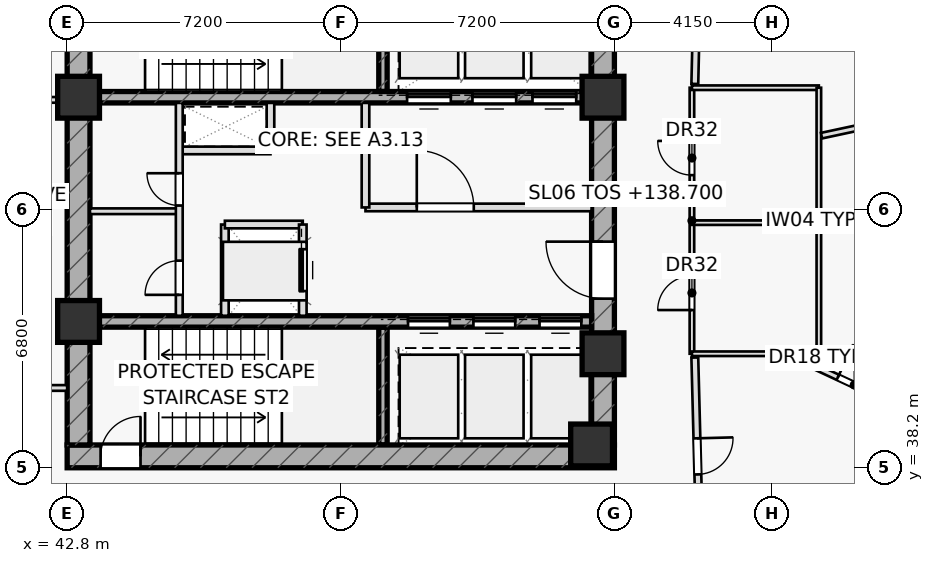
"""IFC4 building model, lengths in metres.
Left out: names, types, materials, properties, quantities, classifications, styles, units other than length and angle.
Written with IfcOpenShell. Run it as: python <this file> out.ifc"""

import sys

from ifc_helpers import new_model, si_unit, direction, frame, frame_2d, origin, origin_2d, place, context, subcontext, project, spatial, rectangle, extrude, element, fill, save


model = new_model("IFC4")
c1 = context("Model", 3, precision=1e-05, world=origin(), true_north=direction((0.0, 1.0)))
c2 = subcontext(c1, "Body", "Model", "MODEL_VIEW")
j1 = project(units=[si_unit("LENGTHUNIT", "METRE"), si_unit("PLANEANGLEUNIT", "RADIAN")], contexts=[c1])
p1 = place(None, origin())
s1 = spatial("IfcSite", under=j1, at=p1, CompositionType="ELEMENT")
p2 = place(p1, origin())
s2 = spatial("IfcBuilding", under=s1, at=p2, CompositionType="ELEMENT")
p3 = place(p2, frame((0.0, 0.0, 138.7)))
s3 = spatial("IfcBuildingStorey", under=s2, at=p3, CompositionType="ELEMENT", Elevation=138.7)
for number, where, z_axis, x_axis in (
    (1, (51.11, 48.1, 0.0), (0.0, 0.0, 1.0), (0.0, 1.0, 0.0)),
    (2, (51.11, 38.8, 0.0), (0.0, 0.0, 1.0), (0.0, 1.0, 0.0)),
):
    element("IfcWall", number, at=place(p3, frame(where, z_axis=z_axis, x_axis=x_axis)), inside=s3, PredefinedType="SHEAR", context=c2, shape_type="SweptSolid", body=[
        extrude(rectangle(XDim=3.1, YDim=0.22, at=frame_2d((1.55, 0.0))), origin(), (0.0, 0.0, 1.0), 3.55),
    ])
p4 = place(p3, frame((42.8, 38.5, 0.0), z_axis=(0.0, 0.0, 1.0), x_axis=(1.0, 0.0, 0.0)))
e3 = element("IfcWall", 3, at=p4, inside=s3, PredefinedType="SHEAR", context=c2, shape_type="SweptSolid", body=[
    extrude(rectangle(XDim=14.4, YDim=0.6, at=frame_2d((7.2, 0.0))), origin(), (0.0, 0.0, 1.0), 3.55),
])
p5 = place(p4, frame((0.88, 0.0, 0.0)))
e4 = element("IfcOpeningElement", 4, at=p5, cuts=e3, PredefinedType="OPENING", context=c2, shape_type="SweptSolid", body=[
    extrude(rectangle(XDim=1.05, YDim=2.2, at=frame_2d((0.525, 1.1))), frame((0.0, 0.31, 0.0), z_axis=(0.0, -1.0, 0.0), x_axis=(1.0, 0.0, 0.0)), (0.0, 0.0, 1.0), 0.62),
])
p6 = place(p3, frame((43.1, 38.8, 0.0), z_axis=(0.0, 0.0, 1.0), x_axis=(0.0, 1.0, 0.0)))
e5 = element("IfcWall", 5, at=p6, inside=s3, PredefinedType="SHEAR", context=c2, shape_type="SweptSolid", body=[
    extrude(rectangle(XDim=12.4, YDim=0.6, at=frame_2d((6.2, 0.0))), origin(), (0.0, 0.0, 1.0), 3.55),
])
p7 = place(p3, frame((56.9, 38.8, 0.0), z_axis=(0.0, 0.0, 1.0), x_axis=(0.0, 1.0, 0.0)))
e6 = element("IfcWall", 6, at=p7, inside=s3, PredefinedType="SHEAR", context=c2, shape_type="SweptSolid", body=[
    extrude(rectangle(XDim=12.4, YDim=0.6, at=frame_2d((6.2, 0.0))), origin(), (0.0, 0.0, 1.0), 3.55),
])
p8 = place(p7, frame((3.85, 0.0, 0.0)))
e7 = element("IfcOpeningElement", 7, at=p8, cuts=e6, PredefinedType="OPENING", context=c2, shape_type="SweptSolid", body=[
    extrude(rectangle(XDim=1.5, YDim=2.2, at=frame_2d((0.75, 1.1))), frame((0.0, 0.31, 0.0), z_axis=(0.0, -1.0, 0.0), x_axis=(1.0, 0.0, 0.0)), (0.0, 0.0, 1.0), 0.62),
])
p9 = place(p3, frame((43.4, 47.95, 0.0), z_axis=(0.0, 0.0, 1.0), x_axis=(1.0, 0.0, 0.0)))
e8 = element("IfcWall", 8, at=p9, inside=s3, PredefinedType="SHEAR", context=c2, shape_type="SweptSolid", body=[
    extrude(rectangle(XDim=13.2, YDim=0.3, at=frame_2d((6.6, 0.0))), origin(), (0.0, 0.0, 1.0), 3.55),
])
p10 = place(p9, frame((8.345, 0.0, 0.0)))
e9 = element("IfcOpeningElement", 9, at=p10, cuts=e8, PredefinedType="OPENING", context=c2, shape_type="SweptSolid", body=[
    extrude(rectangle(XDim=1.15, YDim=2.2, at=frame_2d((0.575, 1.1))), frame((0.0, 0.16, 0.0), z_axis=(0.0, -1.0, 0.0), x_axis=(1.0, 0.0, 0.0)), (0.0, 0.0, 1.0), 0.32),
])
p11 = place(p9, frame((10.065, 0.0, 0.0)))
e10 = element("IfcOpeningElement", 10, at=p11, cuts=e8, PredefinedType="OPENING", context=c2, shape_type="SweptSolid", body=[
    extrude(rectangle(XDim=1.15, YDim=2.2, at=frame_2d((0.575, 1.1))), frame((0.0, 0.16, 0.0), z_axis=(0.0, -1.0, 0.0), x_axis=(1.0, 0.0, 0.0)), (0.0, 0.0, 1.0), 0.32),
])
p12 = place(p9, frame((11.645, 0.0, 0.0)))
e11 = element("IfcOpeningElement", 11, at=p12, cuts=e8, PredefinedType="OPENING", context=c2, shape_type="SweptSolid", body=[
    extrude(rectangle(XDim=1.15, YDim=2.2, at=frame_2d((0.575, 1.1))), frame((0.0, 0.16, 0.0), z_axis=(0.0, -1.0, 0.0), x_axis=(1.0, 0.0, 0.0)), (0.0, 0.0, 1.0), 0.32),
])
p13 = place(p3, frame((43.4, 42.05, 0.0), z_axis=(0.0, 0.0, 1.0), x_axis=(1.0, 0.0, 0.0)))
e12 = element("IfcWall", 12, at=p13, inside=s3, PredefinedType="SHEAR", context=c2, shape_type="SweptSolid", body=[
    extrude(rectangle(XDim=13.2, YDim=0.3, at=frame_2d((6.6, 0.0))), origin(), (0.0, 0.0, 1.0), 3.55),
])
p14 = place(p13, frame((8.37, 0.0, 0.0)))
e13 = element("IfcOpeningElement", 13, at=p14, cuts=e12, PredefinedType="OPENING", context=c2, shape_type="SweptSolid", body=[
    extrude(rectangle(XDim=1.1, YDim=2.15, at=frame_2d((0.55, 1.075))), frame((0.0, 0.16, 0.0), z_axis=(0.0, -1.0, 0.0), x_axis=(1.0, 0.0, 0.0)), (0.0, 0.0, 1.0), 0.32),
])
p15 = place(p13, frame((10.09, 0.0, 0.0)))
e14 = element("IfcOpeningElement", 14, at=p15, cuts=e12, PredefinedType="OPENING", context=c2, shape_type="SweptSolid", body=[
    extrude(rectangle(XDim=1.1, YDim=2.15, at=frame_2d((0.55, 1.075))), frame((0.0, 0.16, 0.0), z_axis=(0.0, -1.0, 0.0), x_axis=(1.0, 0.0, 0.0)), (0.0, 0.0, 1.0), 0.32),
])
p16 = place(p13, frame((11.83, 0.0, 0.0)))
e15 = element("IfcOpeningElement", 15, at=p16, cuts=e12, PredefinedType="OPENING", context=c2, shape_type="SweptSolid", body=[
    extrude(rectangle(XDim=1.1, YDim=2.15, at=frame_2d((0.55, 1.075))), frame((0.0, 0.16, 0.0), z_axis=(0.0, -1.0, 0.0), x_axis=(1.0, 0.0, 0.0)), (0.0, 0.0, 1.0), 0.32),
])
for number, where, z_axis, x_axis in (
    (16, (43.1, 47.95, 0.0), (0.0, 0.0, 1.0), (1.0, 0.0, 0.0)),
    (17, (56.9, 47.95, 0.0), (0.0, 0.0, 1.0), (1.0, 0.0, 0.0)),
    (18, (43.1, 42.05, 0.0), (0.0, 0.0, 1.0), (1.0, 0.0, 0.0)),
    (19, (56.9, 41.2, 0.0), (0.0, 0.0, 1.0), (1.0, 0.0, 0.0)),
    (20, (56.6, 38.8, 0.0), (0.0, 0.0, 1.0), (1.0, 0.0, 0.0)),
):
    element("IfcColumn", number, at=place(p3, frame(where, z_axis=z_axis, x_axis=x_axis)), inside=s3, PredefinedType="COLUMN", context=c2, shape_type="SweptSolid", body=[
        extrude(rectangle(XDim=1.1, YDim=1.1, at=origin_2d()), origin(), (0.0, 0.0, 1.0), 3.55),
    ])
p17 = place(p3, frame((45.75, 46.55, 0.0), z_axis=(0.0, 0.0, 1.0), x_axis=(1.0, 0.0, 0.0)))
e21 = element("IfcWall", 21, at=p17, inside=s3, PredefinedType="PARTITIONING", context=c2, shape_type="SweptSolid", body=[
    extrude(rectangle(XDim=2.4, YDim=0.2, at=frame_2d((1.2, 0.0))), origin(), (0.0, 0.0, 1.0), 3.55),
])
p18 = place(p3, frame((48.15, 46.55, 0.0), z_axis=(0.0, 0.0, 1.0), x_axis=(0.0, 1.0, 0.0)))
e22 = element("IfcWall", 22, at=p18, inside=s3, PredefinedType="PARTITIONING", context=c2, shape_type="SweptSolid", body=[
    extrude(rectangle(XDim=1.25, YDim=0.2, at=frame_2d((0.625, 0.0))), origin(), (0.0, 0.0, 1.0), 3.55),
])
p19 = place(p3, frame((46.95, 42.2, 0.0), z_axis=(0.0, 0.0, 1.0), x_axis=(0.0, 1.0, 0.0)))
e23 = element("IfcWall", 23, at=p19, inside=s3, PredefinedType="PARTITIONING", context=c2, shape_type="SweptSolid", body=[
    extrude(rectangle(XDim=2.4, YDim=0.2, at=frame_2d((1.2, 0.0))), origin(), (0.0, 0.0, 1.0), 3.55),
])
p20 = place(p3, frame((46.95, 44.6, 0.0), z_axis=(0.0, 0.0, 1.0), x_axis=(1.0, 0.0, 0.0)))
e24 = element("IfcWall", 24, at=p20, inside=s3, PredefinedType="PARTITIONING", context=c2, shape_type="SweptSolid", body=[
    extrude(rectangle(XDim=2.05, YDim=0.2, at=frame_2d((1.025, 0.0))), origin(), (0.0, 0.0, 1.0), 3.55),
])
p21 = place(p3, frame((50.65, 45.05, 0.0), z_axis=(0.0, 0.0, 1.0), x_axis=(1.0, 0.0, 0.0)))
e25 = element("IfcWall", 25, at=p21, inside=s3, PredefinedType="PARTITIONING", context=c2, shape_type="SweptSolid", body=[
    extrude(rectangle(XDim=5.95, YDim=0.2, at=frame_2d((2.975, 0.0))), origin(), (0.0, 0.0, 1.0), 3.55),
])
p22 = place(p21, frame((1.35, 0.0, 0.0)))
e26 = element("IfcOpeningElement", 26, at=p22, cuts=e25, PredefinedType="OPENING", context=c2, shape_type="SweptSolid", body=[
    extrude(rectangle(XDim=1.5, YDim=2.2, at=frame_2d((0.75, 1.1))), frame((0.0, 0.11, 0.0), z_axis=(0.0, -1.0, 0.0), x_axis=(1.0, 0.0, 0.0)), (0.0, 0.0, 1.0), 0.22),
])
p23 = place(p3, frame((50.65, 45.05, 0.0), z_axis=(0.0, 0.0, 1.0), x_axis=(0.0, 1.0, 0.0)))
e27 = element("IfcWall", 27, at=p23, inside=s3, PredefinedType="PARTITIONING", context=c2, shape_type="SweptSolid", body=[
    extrude(rectangle(XDim=2.75, YDim=0.2, at=frame_2d((1.375, 0.0))), origin(), (0.0, 0.0, 1.0), 3.55),
])
p24 = place(p3, frame((43.4, 44.95, 0.0), z_axis=(0.0, 0.0, 1.0), x_axis=(1.0, 0.0, 0.0)))
e28 = element("IfcWall", 28, at=p24, inside=s3, PredefinedType="PARTITIONING", context=c2, shape_type="SweptSolid", body=[
    extrude(rectangle(XDim=2.35, YDim=0.15, at=frame_2d((1.175, 0.0))), origin(), (0.0, 0.0, 1.0), 3.55),
])
p25 = place(p3, frame((45.75, 42.2, 0.0), z_axis=(0.0, 0.0, 1.0), x_axis=(0.0, 1.0, 0.0)))
e29 = element("IfcWall", 29, at=p25, inside=s3, PredefinedType="PARTITIONING", context=c2, shape_type="SweptSolid", body=[
    extrude(rectangle(XDim=5.6, YDim=0.18, at=frame_2d((2.8, 0.0))), origin(), (0.0, 0.0, 1.0), 3.55),
])
p26 = place(p25, frame((0.55, 0.0, 0.0)))
e30 = element("IfcOpeningElement", 30, at=p26, cuts=e29, PredefinedType="OPENING", context=c2, shape_type="SweptSolid", body=[
    extrude(rectangle(XDim=0.9, YDim=2.05, at=frame_2d((0.45, 1.025))), frame((0.0, 0.1, 0.0), z_axis=(0.0, -1.0, 0.0), x_axis=(1.0, 0.0, 0.0)), (0.0, 0.0, 1.0), 0.2),
])
p27 = place(p25, frame((2.9, 0.0, 0.0)))
e31 = element("IfcOpeningElement", 31, at=p27, cuts=e29, PredefinedType="OPENING", context=c2, shape_type="SweptSolid", body=[
    extrude(rectangle(XDim=0.85, YDim=2.05, at=frame_2d((0.425, 1.025))), frame((0.0, 0.1, 0.0), z_axis=(0.0, -1.0, 0.0), x_axis=(1.0, 0.0, 0.0)), (0.0, 0.0, 1.0), 0.2),
])
p28 = place(p3, frame((37.14, 40.3, 0.0), z_axis=(0.0, 0.0, 1.0), x_axis=(1.0, 0.0, 0.0)))
e32 = element("IfcWall", 32, at=p28, inside=s3, PredefinedType="PARTITIONING", context=c2, shape_type="SweptSolid", body=[
    extrude(rectangle(XDim=5.66, YDim=0.15, at=frame_2d((2.83, 0.0))), origin(), (0.0, 0.0, 1.0), 3.55),
])
p29 = place(p28, frame((3.21, 0.0, 0.0)))
e33 = element("IfcOpeningElement", 33, at=p29, cuts=e32, PredefinedType="OPENING", context=c2, shape_type="SweptSolid", body=[
    extrude(rectangle(XDim=0.95, YDim=2.05, at=frame_2d((0.475, 1.025))), frame((0.0, 0.085, 0.0), z_axis=(0.0, -1.0, 0.0), x_axis=(1.0, 0.0, 0.0)), (0.0, 0.0, 1.0), 0.17),
])
p30 = place(p3, frame((37.14, 47.88, 0.0), z_axis=(0.0, 0.0, 1.0), x_axis=(1.0, 0.0, 0.0)))
e34 = element("IfcWall", 34, at=p30, inside=s3, PredefinedType="PARTITIONING", context=c2, shape_type="SweptSolid", body=[
    extrude(rectangle(XDim=5.66, YDim=0.15, at=frame_2d((2.83, 0.0))), origin(), (0.0, 0.0, 1.0), 2.835),
])
p31 = place(p3, frame((59.24, 41.2, 0.0), z_axis=(0.0, 0.0, 1.0), x_axis=(0.0, 1.0, 0.0)))
e35 = element("IfcWall", 35, at=p31, inside=s3, PredefinedType="PARTITIONING", context=c2, shape_type="SweptSolid", body=[
    extrude(rectangle(XDim=7.0, YDim=0.12, at=frame_2d((3.5, 0.0))), origin(), (0.0, 0.0, 1.0), 3.55),
])
p32 = place(p31, frame((1.15, 0.0, 0.0)))
e36 = element("IfcOpeningElement", 36, at=p32, cuts=e35, PredefinedType="OPENING", context=c2, shape_type="SweptSolid", body=[
    extrude(rectangle(XDim=0.9, YDim=2.05, at=frame_2d((0.45, 1.025))), frame((0.0, 0.07, 0.0), z_axis=(0.0, -1.0, 0.0), x_axis=(1.0, 0.0, 0.0)), (0.0, 0.0, 1.0), 0.14),
])
p33 = place(p31, frame((4.7, 0.0, 0.0)))
e37 = element("IfcOpeningElement", 37, at=p33, cuts=e35, PredefinedType="OPENING", context=c2, shape_type="SweptSolid", body=[
    extrude(rectangle(XDim=0.9, YDim=2.05, at=frame_2d((0.45, 1.025))), frame((0.0, 0.07, 0.0), z_axis=(0.0, -1.0, 0.0), x_axis=(1.0, 0.0, 0.0)), (0.0, 0.0, 1.0), 0.14),
])
for number, where, z_axis, x_axis in (
    (38, (59.24, 41.2, 0.0), (0.0, 0.0, 1.0), (1.0, 0.0, 0.0)),
    (39, (59.24, 44.65, 0.0), (0.0, 0.0, 1.0), (1.0, 0.0, 0.0)),
    (40, (59.24, 48.2, 0.0), (0.0, 0.0, 1.0), (1.0, 0.0, 0.0)),
):
    element("IfcWall", number, at=place(p3, frame(where, z_axis=z_axis, x_axis=x_axis)), inside=s3, PredefinedType="PARTITIONING", context=c2, shape_type="SweptSolid", body=[
        extrude(rectangle(XDim=3.34, YDim=0.12, at=frame_2d((1.67, 0.0))), origin(), (0.0, 0.0, 1.0), 3.55),
    ])
p34 = place(p3, frame((62.58, 41.2, 0.0), z_axis=(0.0, 0.0, 1.0), x_axis=(0.0, 1.0, 0.0)))
e41 = element("IfcWall", 41, at=p34, inside=s3, PredefinedType="PARTITIONING", context=c2, shape_type="SweptSolid", body=[
    extrude(rectangle(XDim=7.0, YDim=0.12, at=frame_2d((3.5, 0.0))), origin(), (0.0, 0.0, 1.0), 3.55),
])
p35 = place(p3, frame((61.856, 41.15, 0.0), z_axis=(0.0, 0.0, 1.0), x_axis=(0.906306749667, -0.42262048638, 0.0)))
e42 = element("IfcWall", 42, at=p35, inside=s3, PredefinedType="PARTITIONING", context=c2, shape_type="SweptSolid", body=[
    extrude(rectangle(XDim=16.596, YDim=0.15, at=frame_2d((8.298, 0.0))), origin(), (0.0, 0.0, 1.0), 2.835),
])
p36 = place(p35, frame((1.35, 0.0, 0.0)))
e43 = element("IfcOpeningElement", 43, at=p36, cuts=e42, PredefinedType="OPENING", context=c2, shape_type="SweptSolid", body=[
    extrude(rectangle(XDim=0.95, YDim=2.05, at=frame_2d((0.475, 1.025))), frame((0.0, 0.085, 0.0), z_axis=(0.0, -1.0, 0.0), x_axis=(1.0, 0.0, 0.0)), (0.0, 0.0, 1.0), 0.17),
])
p37 = place(p3, frame((62.65, 46.938, 0.0), z_axis=(0.0, 0.0, 1.0), x_axis=(0.977819728846, 0.209448270173, 0.0)))
e44 = element("IfcWall", 44, at=p37, inside=s3, PredefinedType="PARTITIONING", context=c2, shape_type="SweptSolid", body=[
    extrude(rectangle(XDim=17.123, YDim=0.15, at=frame_2d((8.562, 0.0))), origin(), (0.0, 0.0, 1.0), 2.975),
])
p38 = place(p3, frame((59.451, 54.1, 0.0), z_axis=(0.0, 0.0, 1.0), x_axis=(-0.023271046154, -0.999729192537, 0.0)))
e45 = element("IfcWall", 45, at=p38, inside=s3, PredefinedType="PARTITIONING", context=c2, shape_type="SweptSolid", body=[
    extrude(rectangle(XDim=5.802, YDim=0.18, at=frame_2d((2.901, 0.0))), origin(), (0.0, 0.0, 1.0), 2.835),
])
p39 = place(p38, frame((2.426, 0.0, 0.0)))
e46 = element("IfcOpeningElement", 46, at=p39, cuts=e45, PredefinedType="OPENING", context=c2, shape_type="SweptSolid", body=[
    extrude(rectangle(XDim=0.95, YDim=2.05, at=frame_2d((0.475, 1.025))), frame((0.0, 0.1, 0.0), z_axis=(0.0, -1.0, 0.0), x_axis=(1.0, 0.0, 0.0)), (0.0, 0.0, 1.0), 0.2),
])
p40 = place(p3, frame((59.316, 41.1, 0.0), z_axis=(0.0, 0.0, 1.0), x_axis=(0.025953695765, -0.999663146103, 0.0)))
e47 = element("IfcWall", 47, at=p40, inside=s3, PredefinedType="PARTITIONING", context=c2, shape_type="SweptSolid", body=[
    extrude(rectangle(XDim=5.202, YDim=0.18, at=frame_2d((2.601, 0.0))), origin(), (0.0, 0.0, 1.0), 2.835),
])
p41 = place(p40, frame((2.126, 0.0, 0.0)))
e48 = element("IfcOpeningElement", 48, at=p41, cuts=e47, PredefinedType="OPENING", context=c2, shape_type="SweptSolid", body=[
    extrude(rectangle(XDim=0.95, YDim=2.05, at=frame_2d((0.475, 1.025))), frame((0.0, 0.1, 0.0), z_axis=(0.0, -1.0, 0.0), x_axis=(1.0, 0.0, 0.0)), (0.0, 0.0, 1.0), 0.2),
])
p42 = place(p3, frame((49.0, 42.2, 0.0), z_axis=(0.0, 0.0, 1.0), x_axis=(0.0, 1.0, 0.0)))
e49 = element("IfcWall", 49, at=p42, inside=s3, PredefinedType="PARTITIONING", context=c2, shape_type="SweptSolid", body=[
    extrude(rectangle(XDim=2.4, YDim=0.2, at=frame_2d((1.2, 0.0))), origin(), (0.0, 0.0, 1.0), 3.55),
])
p43 = place(p42, frame((0.65, 0.0, 0.0)))
e50 = element("IfcOpeningElement", 50, at=p43, cuts=e49, PredefinedType="OPENING", context=c2, shape_type="SweptSolid", body=[
    extrude(rectangle(XDim=1.1, YDim=2.15, at=frame_2d((0.55, 1.075))), frame((0.0, 0.11, 0.0), z_axis=(0.0, -1.0, 0.0), x_axis=(1.0, 0.0, 0.0)), (0.0, 0.0, 1.0), 0.22),
])
p44 = place(p5, origin())
e51 = element("IfcDoor", 51, at=p44, inside=s3, OperationType="SINGLE_SWING_RIGHT", PredefinedType="DOOR", context=c2, shape_type="SweptSolid", body=[
    extrude(rectangle(XDim=1.05, YDim=2.2, at=frame_2d((0.525, 1.1))), frame((0.0, 0.025, 0.0), z_axis=(0.0, -1.0, 0.0), x_axis=(1.0, 0.0, 0.0)), (0.0, 0.0, 1.0), 0.05),
])
fill(e4, e51)
p45 = place(p8, origin())
e52 = element("IfcDoor", 52, at=p45, inside=s3, OperationType="SINGLE_SWING_RIGHT", PredefinedType="DOOR", context=c2, shape_type="SweptSolid", body=[
    extrude(rectangle(XDim=1.5, YDim=2.2, at=frame_2d((0.75, 1.1))), frame((0.0, 0.025, 0.0), z_axis=(0.0, -1.0, 0.0), x_axis=(1.0, 0.0, 0.0)), (0.0, 0.0, 1.0), 0.05),
])
fill(e7, e52)
p46 = place(p22, origin())
e53 = element("IfcDoor", 53, at=p46, inside=s3, OperationType="SINGLE_SWING_LEFT", PredefinedType="DOOR", context=c2, shape_type="SweptSolid", body=[
    extrude(rectangle(XDim=1.5, YDim=2.2, at=frame_2d((0.75, 1.1))), frame((0.0, 0.025, 0.0), z_axis=(0.0, -1.0, 0.0), x_axis=(1.0, 0.0, 0.0)), (0.0, 0.0, 1.0), 0.05),
])
fill(e26, e53)
p47 = place(p26, origin())
e54 = element("IfcDoor", 54, at=p47, inside=s3, OperationType="SINGLE_SWING_LEFT", PredefinedType="DOOR", context=c2, shape_type="SweptSolid", body=[
    extrude(rectangle(XDim=0.9, YDim=2.05, at=frame_2d((0.45, 1.025))), frame((0.0, 0.025, 0.0), z_axis=(0.0, -1.0, 0.0), x_axis=(1.0, 0.0, 0.0)), (0.0, 0.0, 1.0), 0.05),
])
fill(e30, e54)
p48 = place(p27, origin())
e55 = element("IfcDoor", 55, at=p48, inside=s3, OperationType="SINGLE_SWING_RIGHT", PredefinedType="DOOR", context=c2, shape_type="SweptSolid", body=[
    extrude(rectangle(XDim=0.85, YDim=2.05, at=frame_2d((0.425, 1.025))), frame((0.0, 0.025, 0.0), z_axis=(0.0, -1.0, 0.0), x_axis=(1.0, 0.0, 0.0)), (0.0, 0.0, 1.0), 0.05),
])
fill(e31, e55)
p49 = place(p32, origin())
e56 = element("IfcDoor", 56, at=p49, inside=s3, OperationType="SINGLE_SWING_LEFT", PredefinedType="DOOR", context=c2, shape_type="SweptSolid", body=[
    extrude(rectangle(XDim=0.9, YDim=2.05, at=frame_2d((0.45, 1.025))), frame((0.0, 0.025, 0.0), z_axis=(0.0, -1.0, 0.0), x_axis=(1.0, 0.0, 0.0)), (0.0, 0.0, 1.0), 0.05),
])
fill(e36, e56)
p50 = place(p33, origin())
e57 = element("IfcDoor", 57, at=p50, inside=s3, OperationType="SINGLE_SWING_RIGHT", PredefinedType="DOOR", context=c2, shape_type="SweptSolid", body=[
    extrude(rectangle(XDim=0.9, YDim=2.05, at=frame_2d((0.45, 1.025))), frame((0.0, 0.025, 0.0), z_axis=(0.0, -1.0, 0.0), x_axis=(1.0, 0.0, 0.0)), (0.0, 0.0, 1.0), 0.05),
])
fill(e37, e57)
p51 = place(p36, origin())
e58 = element("IfcDoor", 58, at=p51, inside=s3, OperationType="SINGLE_SWING_LEFT", PredefinedType="DOOR", context=c2, shape_type="SweptSolid", body=[
    extrude(rectangle(XDim=0.95, YDim=2.05, at=frame_2d((0.475, 1.025))), frame((0.0, 0.025, 0.0), z_axis=(0.0, -1.0, 0.0), x_axis=(1.0, 0.0, 0.0)), (0.0, 0.0, 1.0), 0.05),
])
fill(e43, e58)
p52 = place(p41, origin())
e59 = element("IfcDoor", 59, at=p52, inside=s3, OperationType="SINGLE_SWING_LEFT", PredefinedType="DOOR", context=c2, shape_type="SweptSolid", body=[
    extrude(rectangle(XDim=0.95, YDim=2.05, at=frame_2d((0.475, 1.025))), frame((0.0, 0.025, 0.0), z_axis=(0.0, -1.0, 0.0), x_axis=(1.0, 0.0, 0.0)), (0.0, 0.0, 1.0), 0.05),
])
fill(e48, e59)
p53 = place(p10, origin())
e60 = element("IfcDoor", 60, at=p53, inside=s3, OperationType="SLIDING_TO_LEFT", PredefinedType="DOOR", context=c2, shape_type="SweptSolid", body=[
    extrude(rectangle(XDim=1.15, YDim=2.2, at=frame_2d((0.575, 1.1))), frame((0.0, 0.025, 0.0), z_axis=(0.0, -1.0, 0.0), x_axis=(1.0, 0.0, 0.0)), (0.0, 0.0, 1.0), 0.05),
])
fill(e9, e60)
p54 = place(p11, origin())
e61 = element("IfcDoor", 61, at=p54, inside=s3, OperationType="SLIDING_TO_LEFT", PredefinedType="DOOR", context=c2, shape_type="SweptSolid", body=[
    extrude(rectangle(XDim=1.15, YDim=2.2, at=frame_2d((0.575, 1.1))), frame((0.0, 0.025, 0.0), z_axis=(0.0, -1.0, 0.0), x_axis=(1.0, 0.0, 0.0)), (0.0, 0.0, 1.0), 0.05),
])
fill(e10, e61)
p55 = place(p12, origin())
e62 = element("IfcDoor", 62, at=p55, inside=s3, OperationType="SLIDING_TO_LEFT", PredefinedType="DOOR", context=c2, shape_type="SweptSolid", body=[
    extrude(rectangle(XDim=1.15, YDim=2.2, at=frame_2d((0.575, 1.1))), frame((0.0, 0.025, 0.0), z_axis=(0.0, -1.0, 0.0), x_axis=(1.0, 0.0, 0.0)), (0.0, 0.0, 1.0), 0.05),
])
fill(e11, e62)
p56 = place(p14, origin())
e63 = element("IfcDoor", 63, at=p56, inside=s3, OperationType="SLIDING_TO_LEFT", PredefinedType="DOOR", context=c2, shape_type="SweptSolid", body=[
    extrude(rectangle(XDim=1.1, YDim=2.15, at=frame_2d((0.55, 1.075))), frame((0.0, 0.025, 0.0), z_axis=(0.0, -1.0, 0.0), x_axis=(1.0, 0.0, 0.0)), (0.0, 0.0, 1.0), 0.05),
])
fill(e13, e63)
p57 = place(p15, origin())
e64 = element("IfcDoor", 64, at=p57, inside=s3, OperationType="SLIDING_TO_LEFT", PredefinedType="DOOR", context=c2, shape_type="SweptSolid", body=[
    extrude(rectangle(XDim=1.1, YDim=2.15, at=frame_2d((0.55, 1.075))), frame((0.0, 0.025, 0.0), z_axis=(0.0, -1.0, 0.0), x_axis=(1.0, 0.0, 0.0)), (0.0, 0.0, 1.0), 0.05),
])
fill(e14, e64)
p58 = place(p16, origin())
e65 = element("IfcDoor", 65, at=p58, inside=s3, OperationType="SLIDING_TO_LEFT", PredefinedType="DOOR", context=c2, shape_type="SweptSolid", body=[
    extrude(rectangle(XDim=1.1, YDim=2.15, at=frame_2d((0.55, 1.075))), frame((0.0, 0.025, 0.0), z_axis=(0.0, -1.0, 0.0), x_axis=(1.0, 0.0, 0.0)), (0.0, 0.0, 1.0), 0.05),
])
fill(e15, e65)
p59 = place(p43, origin())
e66 = element("IfcDoor", 66, at=p59, inside=s3, OperationType="SLIDING_TO_RIGHT", PredefinedType="DOOR", context=c2, shape_type="SweptSolid", body=[
    extrude(rectangle(XDim=1.1, YDim=2.15, at=frame_2d((0.55, 1.075))), frame((0.0, 0.025, 0.0), z_axis=(0.0, -1.0, 0.0), x_axis=(1.0, 0.0, 0.0)), (0.0, 0.0, 1.0), 0.05),
])
fill(e50, e66)
save(model, sys.argv[1])
